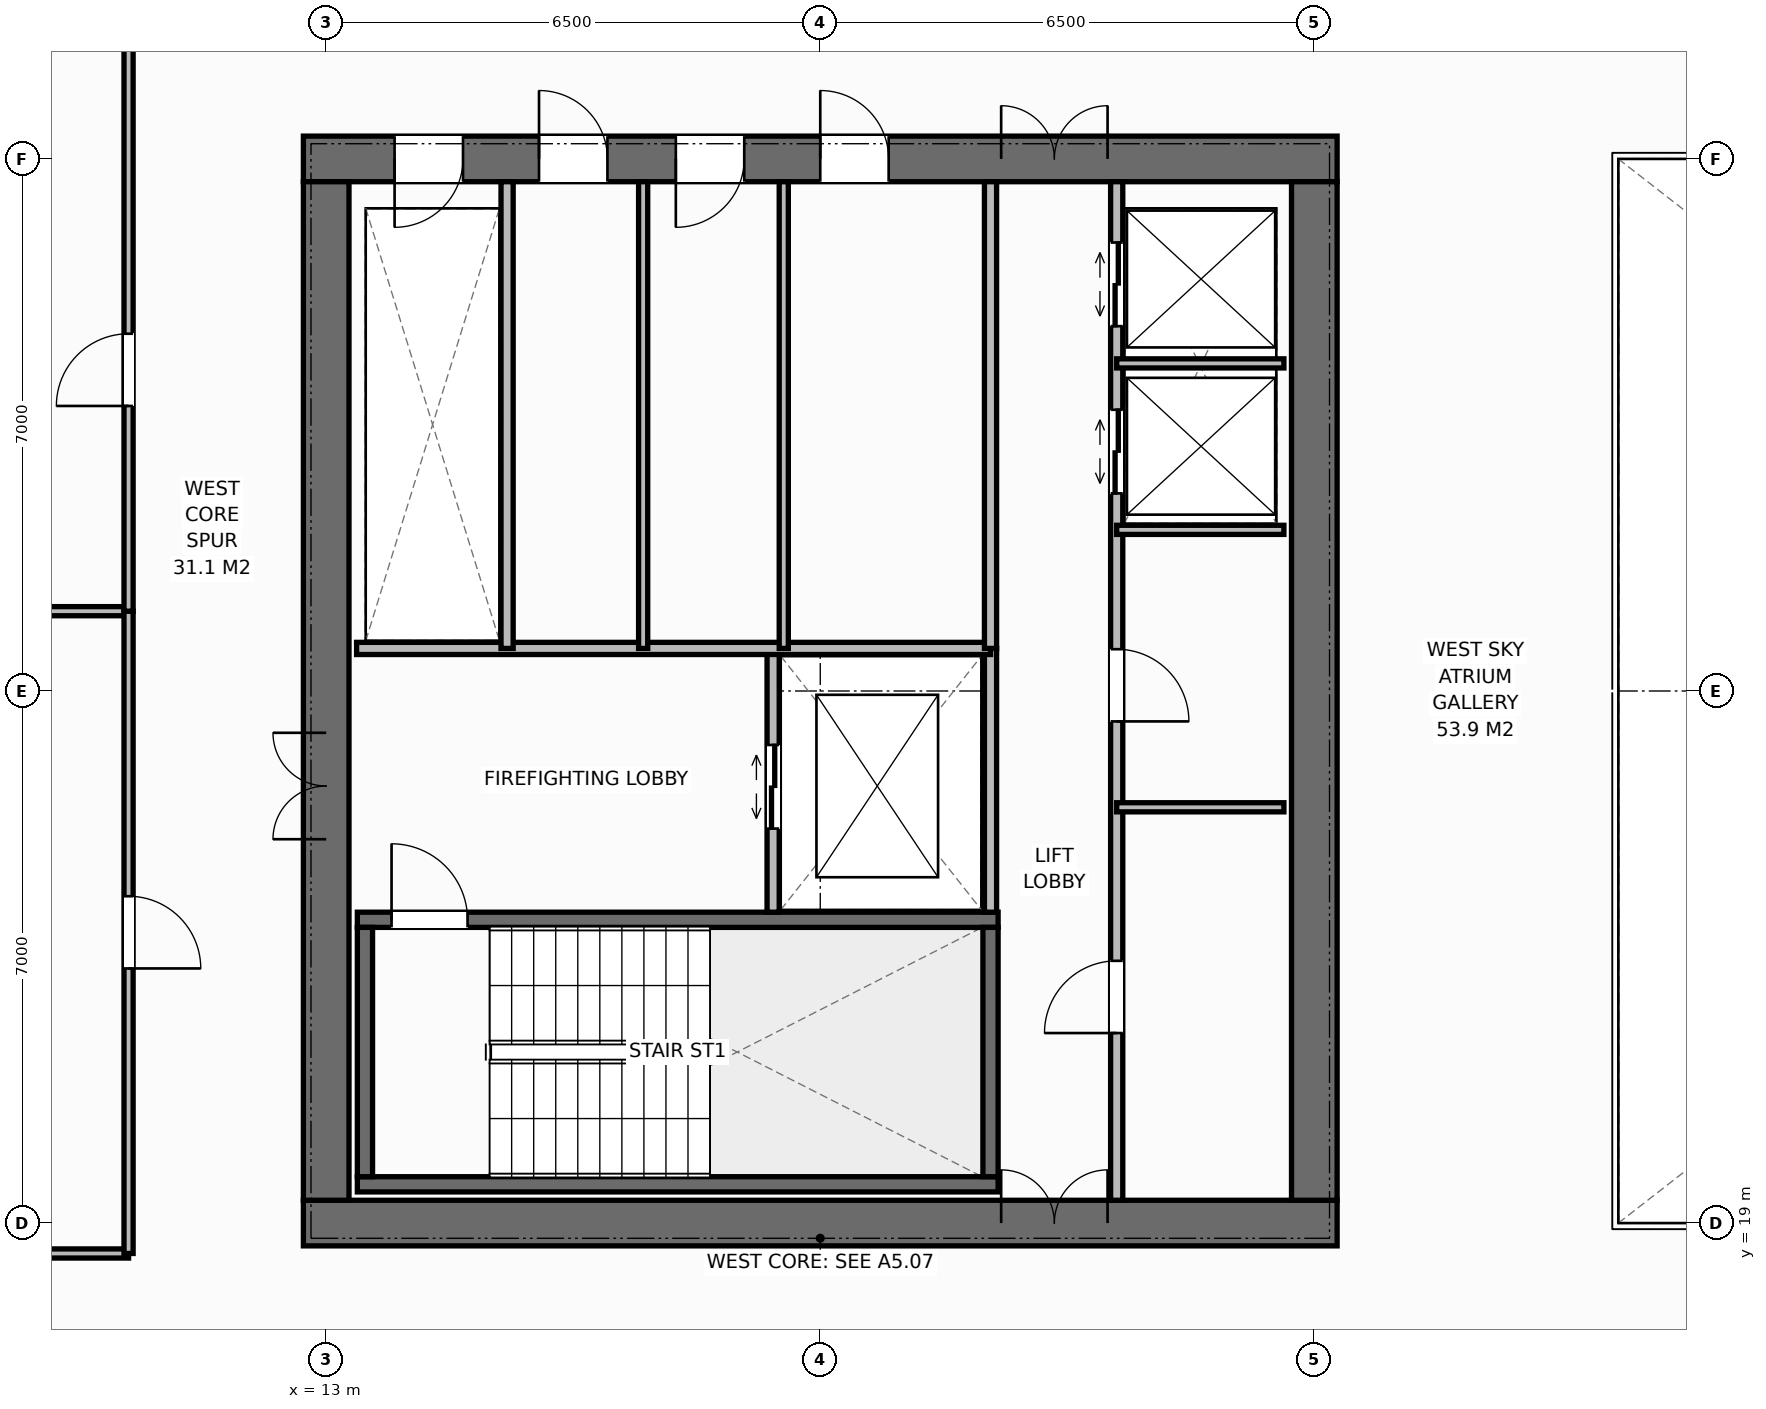
"""IFC4 building model, lengths in metres.
Left out: names, types, materials, properties, quantities, classifications, styles, units other than length and angle.
Written with IfcOpenShell. Run it as: python <this file> out.ifc"""

import sys

from ifc_helpers import new_model, si_unit, direction, frame, frame_2d, origin, place, context, subcontext, project, spatial, rectangle, extrude, element, fill, save


model = new_model("IFC4")
c1 = context("Model", 3, precision=1e-05, world=origin(), true_north=direction((0.0, 1.0)))
c2 = subcontext(c1, "Body", "Model", "MODEL_VIEW")
j1 = project(units=[si_unit("LENGTHUNIT", "METRE"), si_unit("PLANEANGLEUNIT", "RADIAN")], contexts=[c1])
p1 = place(None, origin())
s1 = spatial("IfcSite", under=j1, at=p1, CompositionType="ELEMENT")
p2 = place(p1, origin())
s2 = spatial("IfcBuilding", under=s1, at=p2, CompositionType="ELEMENT")
p3 = place(p2, frame((0.0, 0.0, 178.4)))
s3 = spatial("IfcBuildingStorey", under=s2, at=p3, CompositionType="ELEMENT", Elevation=178.4)
p4 = place(p3, frame((12.7, 19.0, 0.0), z_axis=(0.0, 0.0, 1.0), x_axis=(1.0, 0.0, 0.0)))
e1 = element("IfcWall", 1, at=p4, inside=s3, PredefinedType="SHEAR", context=c2, shape_type="SweptSolid", body=[
    extrude(rectangle(XDim=13.6, YDim=0.6, at=frame_2d((6.8, 0.0))), origin(), (0.0, 0.0, 1.0), 3.8),
])
p5 = place(p4, frame((9.18, 0.0, 0.0)))
e2 = element("IfcOpeningElement", 2, at=p5, cuts=e1, PredefinedType="OPENING", context=c2, shape_type="SweptSolid", body=[
    extrude(rectangle(XDim=1.4, YDim=2.2, at=frame_2d((0.7, 1.1))), frame((0.0, 0.31, 0.0), z_axis=(0.0, -1.0, 0.0), x_axis=(1.0, 0.0, 0.0)), (0.0, 0.0, 1.0), 0.62),
])
p6 = place(p3, frame((12.7, 33.0, 0.0), z_axis=(0.0, 0.0, 1.0), x_axis=(1.0, 0.0, 0.0)))
e3 = element("IfcWall", 3, at=p6, inside=s3, PredefinedType="SHEAR", context=c2, shape_type="SweptSolid", body=[
    extrude(rectangle(XDim=13.6, YDim=0.6, at=frame_2d((6.8, 0.0))), origin(), (0.0, 0.0, 1.0), 3.8),
])
p7 = place(p6, frame((1.2, 0.0, 0.0)))
e4 = element("IfcOpeningElement", 4, at=p7, cuts=e3, PredefinedType="OPENING", context=c2, shape_type="SweptSolid", body=[
    extrude(rectangle(XDim=0.9, YDim=2.15, at=frame_2d((0.45, 1.075))), frame((0.0, 0.31, 0.0), z_axis=(0.0, -1.0, 0.0), x_axis=(1.0, 0.0, 0.0)), (0.0, 0.0, 1.0), 0.62),
])
p8 = place(p6, frame((3.1, 0.0, 0.0)))
e5 = element("IfcOpeningElement", 5, at=p8, cuts=e3, PredefinedType="OPENING", context=c2, shape_type="SweptSolid", body=[
    extrude(rectangle(XDim=0.9, YDim=2.15, at=frame_2d((0.45, 1.075))), frame((0.0, 0.31, 0.0), z_axis=(0.0, -1.0, 0.0), x_axis=(1.0, 0.0, 0.0)), (0.0, 0.0, 1.0), 0.62),
])
p9 = place(p6, frame((4.9, 0.0, 0.0)))
e6 = element("IfcOpeningElement", 6, at=p9, cuts=e3, PredefinedType="OPENING", context=c2, shape_type="SweptSolid", body=[
    extrude(rectangle(XDim=0.9, YDim=2.15, at=frame_2d((0.45, 1.075))), frame((0.0, 0.31, 0.0), z_axis=(0.0, -1.0, 0.0), x_axis=(1.0, 0.0, 0.0)), (0.0, 0.0, 1.0), 0.62),
])
p10 = place(p6, frame((6.8, 0.0, 0.0)))
e7 = element("IfcOpeningElement", 7, at=p10, cuts=e3, PredefinedType="OPENING", context=c2, shape_type="SweptSolid", body=[
    extrude(rectangle(XDim=0.9, YDim=2.15, at=frame_2d((0.45, 1.075))), frame((0.0, 0.31, 0.0), z_axis=(0.0, -1.0, 0.0), x_axis=(1.0, 0.0, 0.0)), (0.0, 0.0, 1.0), 0.62),
])
p11 = place(p6, frame((9.18, 0.0, 0.0)))
e8 = element("IfcOpeningElement", 8, at=p11, cuts=e3, PredefinedType="OPENING", context=c2, shape_type="SweptSolid", body=[
    extrude(rectangle(XDim=1.4, YDim=2.2, at=frame_2d((0.7, 1.1))), frame((0.0, 0.31, 0.0), z_axis=(0.0, -1.0, 0.0), x_axis=(1.0, 0.0, 0.0)), (0.0, 0.0, 1.0), 0.62),
])
p12 = place(p3, frame((13.0, 19.3, 0.0), z_axis=(0.0, 0.0, 1.0), x_axis=(0.0, 1.0, 0.0)))
e9 = element("IfcWall", 9, at=p12, inside=s3, PredefinedType="SHEAR", context=c2, shape_type="SweptSolid", body=[
    extrude(rectangle(XDim=13.4, YDim=0.6, at=frame_2d((6.7, 0.0))), origin(), (0.0, 0.0, 1.0), 3.8),
])
p13 = place(p12, frame((4.75, 0.0, 0.0)))
e10 = element("IfcOpeningElement", 10, at=p13, cuts=e9, PredefinedType="OPENING", context=c2, shape_type="SweptSolid", body=[
    extrude(rectangle(XDim=1.4, YDim=2.2, at=frame_2d((0.7, 1.1))), frame((0.0, 0.31, 0.0), z_axis=(0.0, -1.0, 0.0), x_axis=(1.0, 0.0, 0.0)), (0.0, 0.0, 1.0), 0.62),
])
p14 = place(p3, frame((26.0, 19.3, 0.0), z_axis=(0.0, 0.0, 1.0), x_axis=(0.0, 1.0, 0.0)))
e11 = element("IfcWall", 11, at=p14, inside=s3, PredefinedType="SHEAR", context=c2, shape_type="SweptSolid", body=[
    extrude(rectangle(XDim=13.4, YDim=0.6, at=frame_2d((6.7, 0.0))), origin(), (0.0, 0.0, 1.0), 3.8),
])
p15 = place(p3, frame((13.41, 19.51, 0.0), z_axis=(0.0, 0.0, 1.0), x_axis=(1.0, 0.0, 0.0)))
e12 = element("IfcWall", 12, at=p15, inside=s3, PredefinedType="SHEAR", context=c2, shape_type="SweptSolid", body=[
    extrude(rectangle(XDim=8.43, YDim=0.2, at=frame_2d((4.215, 0.0))), origin(), (0.0, 0.0, 1.0), 3.8),
])
p16 = place(p3, frame((13.41, 22.99, 0.0), z_axis=(0.0, 0.0, 1.0), x_axis=(1.0, 0.0, 0.0)))
e13 = element("IfcWall", 13, at=p16, inside=s3, PredefinedType="SHEAR", context=c2, shape_type="SweptSolid", body=[
    extrude(rectangle(XDim=8.43, YDim=0.2, at=frame_2d((4.215, 0.0))), origin(), (0.0, 0.0, 1.0), 3.8),
])
p17 = place(p16, frame((0.45, 0.0, 0.0)))
e14 = element("IfcOpeningElement", 14, at=p17, cuts=e13, PredefinedType="OPENING", context=c2, shape_type="SweptSolid", body=[
    extrude(rectangle(XDim=1.0, YDim=2.15, at=frame_2d((0.5, 1.075))), frame((0.0, 0.11, 0.0), z_axis=(0.0, -1.0, 0.0), x_axis=(1.0, 0.0, 0.0)), (0.0, 0.0, 1.0), 0.22),
])
for number, where, z_axis, x_axis in (
    (15, (13.51, 19.61, 0.0), (0.0, 0.0, 1.0), (0.0, 1.0, 0.0)),
    (16, (21.74, 19.61, 0.0), (0.0, 0.0, 1.0), (0.0, 1.0, 0.0)),
):
    element("IfcWall", number, at=place(p3, frame(where, z_axis=z_axis, x_axis=x_axis)), inside=s3, PredefinedType="SHEAR", context=c2, shape_type="SweptSolid", body=[
        extrude(rectangle(XDim=3.28, YDim=0.2, at=frame_2d((1.64, 0.0))), origin(), (0.0, 0.0, 1.0), 3.8),
    ])
p18 = place(p3, frame((21.74, 23.09, 0.0), z_axis=(0.0, 0.0, 1.0), x_axis=(0.0, 1.0, 0.0)))
e17 = element("IfcWall", 17, at=p18, inside=s3, PredefinedType="STANDARD", context=c2, shape_type="SweptSolid", body=[
    extrude(rectangle(XDim=3.47, YDim=0.16, at=frame_2d((1.735, 0.0))), origin(), (0.0, 0.0, 1.0), 3.572),
])
p19 = place(p3, frame((18.88, 23.09, 0.0), z_axis=(0.0, 0.0, 1.0), x_axis=(0.0, 1.0, 0.0)))
e18 = element("IfcWall", 18, at=p19, inside=s3, PredefinedType="STANDARD", context=c2, shape_type="SweptSolid", body=[
    extrude(rectangle(XDim=3.47, YDim=0.16, at=frame_2d((1.735, 0.0))), origin(), (0.0, 0.0, 1.0), 3.572),
])
p20 = place(p19, frame((1.1, 0.0, 0.0)))
e19 = element("IfcOpeningElement", 19, at=p20, cuts=e18, PredefinedType="OPENING", context=c2, shape_type="SweptSolid", body=[
    extrude(rectangle(XDim=1.1, YDim=2.2, at=frame_2d((0.55, 1.1))), frame((0.0, 0.09, 0.0), z_axis=(0.0, -1.0, 0.0), x_axis=(1.0, 0.0, 0.0)), (0.0, 0.0, 1.0), 0.18),
])
p21 = place(p3, frame((13.4, 26.56, 0.0), z_axis=(0.0, 0.0, 1.0), x_axis=(1.0, 0.0, 0.0)))
e20 = element("IfcWall", 20, at=p21, inside=s3, PredefinedType="STANDARD", context=c2, shape_type="SweptSolid", body=[
    extrude(rectangle(XDim=8.34, YDim=0.16, at=frame_2d((4.17, 0.0))), origin(), (0.0, 0.0, 1.0), 3.572),
])
p22 = place(p3, frame((15.38, 26.56, 0.0), z_axis=(0.0, 0.0, 1.0), x_axis=(0.0, 1.0, 0.0)))
e21 = element("IfcWall", 21, at=p22, inside=s3, PredefinedType="STANDARD", context=c2, shape_type="SweptSolid", body=[
    extrude(rectangle(XDim=6.14, YDim=0.16, at=frame_2d((3.07, 0.0))), origin(), (0.0, 0.0, 1.0), 3.572),
])
for number, where, z_axis, x_axis in (
    (22, (17.17, 26.56, 0.0), (0.0, 0.0, 1.0), (0.0, 1.0, 0.0)),
    (23, (19.02, 26.56, 0.0), (0.0, 0.0, 1.0), (0.0, 1.0, 0.0)),
):
    element("IfcWall", number, at=place(p3, frame(where, z_axis=z_axis, x_axis=x_axis)), inside=s3, PredefinedType="PARTITIONING", context=c2, shape_type="SweptSolid", body=[
        extrude(rectangle(XDim=6.14, YDim=0.12, at=frame_2d((3.07, 0.0))), origin(), (0.0, 0.0, 1.0), 3.572),
    ])
p23 = place(p3, frame((21.74, 26.56, 0.0), z_axis=(0.0, 0.0, 1.0), x_axis=(0.0, 1.0, 0.0)))
e24 = element("IfcWall", 24, at=p23, inside=s3, PredefinedType="STANDARD", context=c2, shape_type="SweptSolid", body=[
    extrude(rectangle(XDim=6.14, YDim=0.16, at=frame_2d((3.07, 0.0))), origin(), (0.0, 0.0, 1.0), 3.572),
])
p24 = place(p3, frame((23.4, 19.3, 0.0), z_axis=(0.0, 0.0, 1.0), x_axis=(0.0, 1.0, 0.0)))
e25 = element("IfcWall", 25, at=p24, inside=s3, PredefinedType="STANDARD", context=c2, shape_type="SweptSolid", body=[
    extrude(rectangle(XDim=13.4, YDim=0.16, at=frame_2d((6.7, 0.0))), origin(), (0.0, 0.0, 1.0), 3.572),
])
p25 = place(p24, frame((2.2, 0.0, 0.0)))
e26 = element("IfcOpeningElement", 26, at=p25, cuts=e25, PredefinedType="OPENING", context=c2, shape_type="SweptSolid", body=[
    extrude(rectangle(XDim=0.95, YDim=2.15, at=frame_2d((0.475, 1.075))), frame((0.0, 0.09, 0.0), z_axis=(0.0, -1.0, 0.0), x_axis=(1.0, 0.0, 0.0)), (0.0, 0.0, 1.0), 0.18),
])
p26 = place(p24, frame((6.3, 0.0, 0.0)))
e27 = element("IfcOpeningElement", 27, at=p26, cuts=e25, PredefinedType="OPENING", context=c2, shape_type="SweptSolid", body=[
    extrude(rectangle(XDim=0.95, YDim=2.15, at=frame_2d((0.475, 1.075))), frame((0.0, 0.09, 0.0), z_axis=(0.0, -1.0, 0.0), x_axis=(1.0, 0.0, 0.0)), (0.0, 0.0, 1.0), 0.18),
])
p27 = place(p24, frame((9.3, 0.0, 0.0)))
e28 = element("IfcOpeningElement", 28, at=p27, cuts=e25, PredefinedType="OPENING", context=c2, shape_type="SweptSolid", body=[
    extrude(rectangle(XDim=1.1, YDim=2.2, at=frame_2d((0.55, 1.1))), frame((0.0, 0.09, 0.0), z_axis=(0.0, -1.0, 0.0), x_axis=(1.0, 0.0, 0.0)), (0.0, 0.0, 1.0), 0.18),
])
p28 = place(p24, frame((11.5, 0.0, 0.0)))
e29 = element("IfcOpeningElement", 29, at=p28, cuts=e25, PredefinedType="OPENING", context=c2, shape_type="SweptSolid", body=[
    extrude(rectangle(XDim=1.1, YDim=2.2, at=frame_2d((0.55, 1.1))), frame((0.0, 0.09, 0.0), z_axis=(0.0, -1.0, 0.0), x_axis=(1.0, 0.0, 0.0)), (0.0, 0.0, 1.0), 0.18),
])
for number, where, z_axis, x_axis in (
    (30, (23.4, 24.47, 0.0), (0.0, 0.0, 1.0), (1.0, 0.0, 0.0)),
    (31, (23.4, 28.12, 0.0), (0.0, 0.0, 1.0), (1.0, 0.0, 0.0)),
    (32, (23.4, 30.31, 0.0), (0.0, 0.0, 1.0), (1.0, 0.0, 0.0)),
):
    element("IfcWall", number, at=place(p3, frame(where, z_axis=z_axis, x_axis=x_axis)), inside=s3, PredefinedType="PARTITIONING", context=c2, shape_type="SweptSolid", body=[
        extrude(rectangle(XDim=2.2, YDim=0.12, at=frame_2d((1.1, 0.0))), origin(), (0.0, 0.0, 1.0), 3.572),
    ])
for number, where, z_axis, x_axis in (
    (33, (3.82, 18.6, 0.0), (0.0, 0.0, 1.0), (1.0, 0.0, 0.0)),
    (34, (3.82, 27.05, 0.0), (0.0, 0.0, 1.0), (1.0, 0.0, 0.0)),
):
    element("IfcWall", number, at=place(p3, frame(where, z_axis=z_axis, x_axis=x_axis)), inside=s3, PredefinedType="PARTITIONING", context=c2, shape_type="SweptSolid", body=[
        extrude(rectangle(XDim=6.58, YDim=0.12, at=frame_2d((3.29, 0.0))), origin(), (0.0, 0.0, 1.0), 3.572),
    ])
p29 = place(p3, frame((10.4, 18.6, 0.0), z_axis=(0.0, 0.0, 1.0), x_axis=(0.0, 1.0, 0.0)))
e35 = element("IfcWall", 35, at=p29, inside=s3, PredefinedType="PARTITIONING", context=c2, shape_type="SweptSolid", body=[
    extrude(rectangle(XDim=8.45, YDim=0.12, at=frame_2d((4.225, 0.0))), origin(), (0.0, 0.0, 1.0), 3.572),
])
p30 = place(p29, frame((3.75, 0.0, 0.0)))
e36 = element("IfcOpeningElement", 36, at=p30, cuts=e35, PredefinedType="OPENING", context=c2, shape_type="SweptSolid", body=[
    extrude(rectangle(XDim=0.95, YDim=2.15, at=frame_2d((0.475, 1.075))), frame((0.0, 0.07, 0.0), z_axis=(0.0, -1.0, 0.0), x_axis=(1.0, 0.0, 0.0)), (0.0, 0.0, 1.0), 0.14),
])
p31 = place(p3, frame((10.4, 27.05, 0.0), z_axis=(0.0, 0.0, 1.0), x_axis=(0.0, 1.0, 0.0)))
e37 = element("IfcWall", 37, at=p31, inside=s3, PredefinedType="PARTITIONING", context=c2, shape_type="SweptSolid", body=[
    extrude(rectangle(XDim=8.45, YDim=0.12, at=frame_2d((4.225, 0.0))), origin(), (0.0, 0.0, 1.0), 3.572),
])
p32 = place(p31, frame((2.7, 0.0, 0.0)))
e38 = element("IfcOpeningElement", 38, at=p32, cuts=e37, PredefinedType="OPENING", context=c2, shape_type="SweptSolid", body=[
    extrude(rectangle(XDim=0.95, YDim=2.15, at=frame_2d((0.475, 1.075))), frame((0.0, 0.07, 0.0), z_axis=(0.0, -1.0, 0.0), x_axis=(1.0, 0.0, 0.0)), (0.0, 0.0, 1.0), 0.14),
])
p33 = place(p17, origin())
e39 = element("IfcDoor", 39, at=p33, inside=s3, OperationType="SINGLE_SWING_LEFT", PredefinedType="DOOR", context=c2, shape_type="SweptSolid", body=[
    extrude(rectangle(XDim=1.0, YDim=2.15, at=frame_2d((0.5, 1.075))), frame((0.0, 0.025, 0.0), z_axis=(0.0, -1.0, 0.0), x_axis=(1.0, 0.0, 0.0)), (0.0, 0.0, 1.0), 0.05),
])
fill(e14, e39)
p34 = place(p13, origin())
e40 = element("IfcDoor", 40, at=p34, inside=s3, OperationType="DOUBLE_DOOR_SINGLE_SWING", PredefinedType="DOOR", context=c2, shape_type="SweptSolid", body=[
    extrude(rectangle(XDim=1.4, YDim=2.2, at=frame_2d((0.7, 1.1))), frame((0.0, 0.025, 0.0), z_axis=(0.0, -1.0, 0.0), x_axis=(1.0, 0.0, 0.0)), (0.0, 0.0, 1.0), 0.05),
])
fill(e10, e40)
p35 = place(p20, origin())
e41 = element("IfcDoor", 41, at=p35, inside=s3, OperationType="DOUBLE_DOOR_SLIDING", PredefinedType="DOOR", context=c2, shape_type="SweptSolid", body=[
    extrude(rectangle(XDim=1.1, YDim=2.2, at=frame_2d((0.55, 1.1))), frame((0.0, 0.025, 0.0), z_axis=(0.0, -1.0, 0.0), x_axis=(1.0, 0.0, 0.0)), (0.0, 0.0, 1.0), 0.05),
])
fill(e19, e41)
p36 = place(p7, origin())
e42 = element("IfcDoor", 42, at=p36, inside=s3, OperationType="SINGLE_SWING_RIGHT", PredefinedType="DOOR", context=c2, shape_type="SweptSolid", body=[
    extrude(rectangle(XDim=0.9, YDim=2.15, at=frame_2d((0.45, 1.075))), frame((0.0, -0.025, 0.0), z_axis=(0.0, -1.0, 0.0), x_axis=(1.0, 0.0, 0.0)), (0.0, 0.0, 1.0), 0.05),
])
fill(e4, e42)
p37 = place(p8, origin())
e43 = element("IfcDoor", 43, at=p37, inside=s3, OperationType="SINGLE_SWING_LEFT", PredefinedType="DOOR", context=c2, shape_type="SweptSolid", body=[
    extrude(rectangle(XDim=0.9, YDim=2.15, at=frame_2d((0.45, 1.075))), frame((0.0, -0.025, 0.0), z_axis=(0.0, -1.0, 0.0), x_axis=(1.0, 0.0, 0.0)), (0.0, 0.0, 1.0), 0.05),
])
fill(e5, e43)
p38 = place(p9, origin())
e44 = element("IfcDoor", 44, at=p38, inside=s3, OperationType="SINGLE_SWING_RIGHT", PredefinedType="DOOR", context=c2, shape_type="SweptSolid", body=[
    extrude(rectangle(XDim=0.9, YDim=2.15, at=frame_2d((0.45, 1.075))), frame((0.0, -0.025, 0.0), z_axis=(0.0, -1.0, 0.0), x_axis=(1.0, 0.0, 0.0)), (0.0, 0.0, 1.0), 0.05),
])
fill(e6, e44)
p39 = place(p10, origin())
e45 = element("IfcDoor", 45, at=p39, inside=s3, OperationType="SINGLE_SWING_LEFT", PredefinedType="DOOR", context=c2, shape_type="SweptSolid", body=[
    extrude(rectangle(XDim=0.9, YDim=2.15, at=frame_2d((0.45, 1.075))), frame((0.0, -0.025, 0.0), z_axis=(0.0, -1.0, 0.0), x_axis=(1.0, 0.0, 0.0)), (0.0, 0.0, 1.0), 0.05),
])
fill(e7, e45)
p40 = place(p5, origin())
e46 = element("IfcDoor", 46, at=p40, inside=s3, OperationType="DOUBLE_DOOR_SINGLE_SWING", PredefinedType="DOOR", context=c2, shape_type="SweptSolid", body=[
    extrude(rectangle(XDim=1.4, YDim=2.2, at=frame_2d((0.7, 1.1))), frame((0.0, 0.075, 0.0), z_axis=(0.0, -1.0, 0.0), x_axis=(1.0, 0.0, 0.0)), (0.0, 0.0, 1.0), 0.05),
])
fill(e2, e46)
p41 = place(p11, origin())
e47 = element("IfcDoor", 47, at=p41, inside=s3, OperationType="DOUBLE_DOOR_SINGLE_SWING", PredefinedType="DOOR", context=c2, shape_type="SweptSolid", body=[
    extrude(rectangle(XDim=1.4, YDim=2.2, at=frame_2d((0.7, 1.1))), frame((0.0, -0.025, 0.0), z_axis=(0.0, -1.0, 0.0), x_axis=(1.0, 0.0, 0.0)), (0.0, 0.0, 1.0), 0.05),
])
fill(e8, e47)
p42 = place(p25, origin())
e48 = element("IfcDoor", 48, at=p42, inside=s3, OperationType="SINGLE_SWING_LEFT", PredefinedType="DOOR", context=c2, shape_type="SweptSolid", body=[
    extrude(rectangle(XDim=0.95, YDim=2.15, at=frame_2d((0.475, 1.075))), frame((0.0, 0.025, 0.0), z_axis=(0.0, -1.0, 0.0), x_axis=(1.0, 0.0, 0.0)), (0.0, 0.0, 1.0), 0.05),
])
fill(e26, e48)
p43 = place(p26, origin())
e49 = element("IfcDoor", 49, at=p43, inside=s3, OperationType="SINGLE_SWING_RIGHT", PredefinedType="DOOR", context=c2, shape_type="SweptSolid", body=[
    extrude(rectangle(XDim=0.95, YDim=2.15, at=frame_2d((0.475, 1.075))), frame((0.0, 0.025, 0.0), z_axis=(0.0, -1.0, 0.0), x_axis=(1.0, 0.0, 0.0)), (0.0, 0.0, 1.0), 0.05),
])
fill(e27, e49)
p44 = place(p27, origin())
e50 = element("IfcDoor", 50, at=p44, inside=s3, OperationType="DOUBLE_DOOR_SLIDING", PredefinedType="DOOR", context=c2, shape_type="SweptSolid", body=[
    extrude(rectangle(XDim=1.1, YDim=2.2, at=frame_2d((0.55, 1.1))), frame((0.0, 0.025, 0.0), z_axis=(0.0, -1.0, 0.0), x_axis=(1.0, 0.0, 0.0)), (0.0, 0.0, 1.0), 0.05),
])
fill(e28, e50)
p45 = place(p28, origin())
e51 = element("IfcDoor", 51, at=p45, inside=s3, OperationType="DOUBLE_DOOR_SLIDING", PredefinedType="DOOR", context=c2, shape_type="SweptSolid", body=[
    extrude(rectangle(XDim=1.1, YDim=2.2, at=frame_2d((0.55, 1.1))), frame((0.0, 0.025, 0.0), z_axis=(0.0, -1.0, 0.0), x_axis=(1.0, 0.0, 0.0)), (0.0, 0.0, 1.0), 0.05),
])
fill(e29, e51)
p46 = place(p30, origin())
e52 = element("IfcDoor", 52, at=p46, inside=s3, OperationType="SINGLE_SWING_RIGHT", PredefinedType="DOOR", context=c2, shape_type="SweptSolid", body=[
    extrude(rectangle(XDim=0.95, YDim=2.15, at=frame_2d((0.475, 1.075))), frame((0.0, 0.025, 0.0), z_axis=(0.0, -1.0, 0.0), x_axis=(1.0, 0.0, 0.0)), (0.0, 0.0, 1.0), 0.05),
])
fill(e36, e52)
p47 = place(p32, origin())
e53 = element("IfcDoor", 53, at=p47, inside=s3, OperationType="SINGLE_SWING_LEFT", PredefinedType="DOOR", context=c2, shape_type="SweptSolid", body=[
    extrude(rectangle(XDim=0.95, YDim=2.15, at=frame_2d((0.475, 1.075))), frame((0.0, 0.025, 0.0), z_axis=(0.0, -1.0, 0.0), x_axis=(1.0, 0.0, 0.0)), (0.0, 0.0, 1.0), 0.05),
])
fill(e38, e53)
save(model, sys.argv[1])
